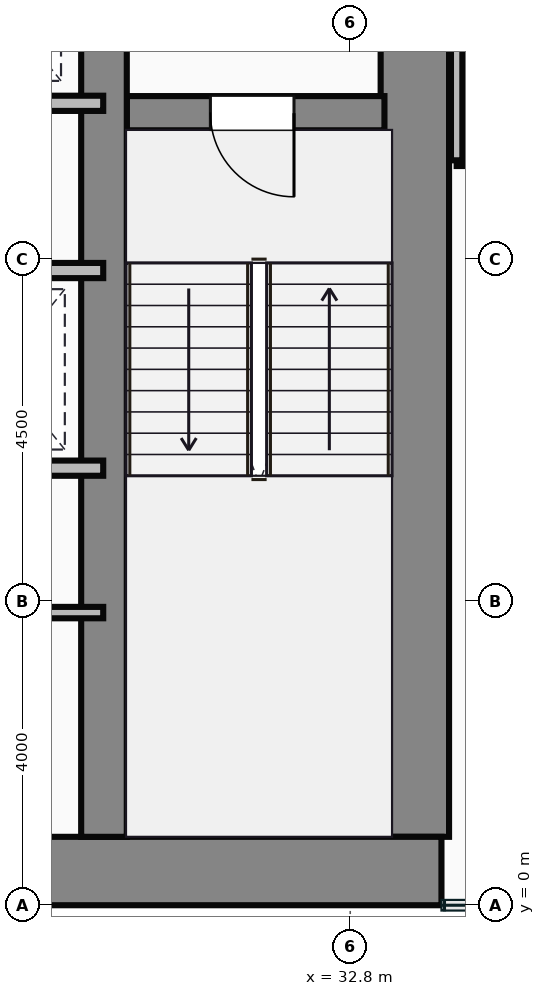
"""IFC4 building model, lengths in metres.
Left out: names, types, materials, properties, quantities, classifications, styles, units other than length and angle.
Written with IfcOpenShell. Run it as: python <this file> out.ifc"""

import sys

from ifc_helpers import new_model, si_unit, direction, frame, frame_2d, origin, place, context, subcontext, project, spatial, rectangle, extrude, source, transform, mapped, element, fill, save


model = new_model("IFC4")
c1 = context("Model", 3, precision=1e-05, world=origin(), true_north=direction((0.0, 1.0)))
c2 = subcontext(c1, "Body", "Model", "MODEL_VIEW")
j1 = project(units=[si_unit("LENGTHUNIT", "METRE"), si_unit("PLANEANGLEUNIT", "RADIAN")], contexts=[c1])
p1 = place(None, origin())
s1 = spatial("IfcSite", under=j1, at=p1, CompositionType="ELEMENT")
p2 = place(p1, origin())
s2 = spatial("IfcBuilding", under=s1, at=p2, CompositionType="ELEMENT")
p3 = place(p2, frame((0.0, 0.0, 61.7)))
s3 = spatial("IfcBuildingStorey", under=s2, at=p3, CompositionType="ELEMENT", Elevation=61.7)
m1 = source(origin(), c2, "Body", "SweptSolid", [
    extrude(rectangle(XDim=29.5, YDim=0.9, at=frame_2d((14.75, 0.0))), origin(), (0.0, 0.0, 1.0), 3.65),
])
p4 = place(p3, frame((4.5, 0.45, 0.0), z_axis=(0.0, 0.0, 1.0), x_axis=(1.0, 0.0, 0.0)))
e1 = element("IfcWall", 1, at=p4, inside=s3, PredefinedType="SHEAR", context=c2, shape_type="MappedRepresentation", body=[
    mapped(m1, transform((0.0, 0.0, 0.0))),
])
m2 = source(origin(), c2, "Body", "SweptSolid", [
    extrude(rectangle(XDim=13.1, YDim=0.9, at=frame_2d((6.55, 0.0))), origin(), (0.0, 0.0, 1.0), 3.65),
])
p5 = place(p3, frame((33.65, 0.9, 0.0), z_axis=(0.0, 0.0, 1.0), x_axis=(0.0, 1.0, 0.0)))
e2 = element("IfcWall", 2, at=p5, inside=s3, PredefinedType="SHEAR", context=c2, shape_type="MappedRepresentation", body=[
    mapped(m2, transform((0.0, 0.0, 0.0))),
])
m3 = source(origin(), c2, "Body", "SweptSolid", [
    extrude(rectangle(XDim=12.2, YDim=0.6, at=frame_2d((6.1, 0.0))), origin(), (0.0, 0.0, 1.0), 3.65),
])
p6 = place(p3, frame((29.56, 0.9, 0.0), z_axis=(0.0, 0.0, 1.0), x_axis=(0.0, 1.0, 0.0)))
e3 = element("IfcWall", 3, at=p6, inside=s3, PredefinedType="SHEAR", context=c2, shape_type="MappedRepresentation", body=[
    mapped(m3, transform((0.0, 0.0, 0.0))),
])
m4 = source(origin(), c2, "Body", "SweptSolid", [
    extrude(rectangle(XDim=3.39, YDim=0.45, at=frame_2d((1.695, 0.0))), origin(), (0.0, 0.0, 1.0), 3.65),
])
p7 = place(p3, frame((29.86, 10.42, 0.0), z_axis=(0.0, 0.0, 1.0), x_axis=(1.0, 0.0, 0.0)))
e4 = element("IfcWall", 4, at=p7, inside=s3, PredefinedType="SHEAR", context=c2, shape_type="MappedRepresentation", body=[
    mapped(m4, transform((0.0, 0.0, 0.0))),
])
p8 = place(p7, frame((1.1, 0.0, 0.0)))
e5 = element("IfcOpeningElement", 5, at=p8, cuts=e4, PredefinedType="OPENING", context=c2, shape_type="SweptSolid", body=[
    extrude(rectangle(XDim=1.1, YDim=2.15, at=frame_2d((0.55, 1.075))), frame((0.0, 0.235, 0.0), z_axis=(0.0, -1.0, 0.0), x_axis=(1.0, 0.0, 0.0)), (0.0, 0.0, 1.0), 0.47),
])
m5 = source(origin(), c2, "Body", "SweptSolid", [
    extrude(rectangle(XDim=8.8, YDim=0.2, at=frame_2d((4.4, 0.0))), origin(), (0.0, 0.0, 1.0), 3.4),
])
p9 = place(p3, frame((20.75, 10.55, 0.0), z_axis=(0.0, 0.0, 1.0), x_axis=(1.0, 0.0, 0.0)))
e6 = element("IfcWall", 6, at=p9, inside=s3, PredefinedType="PARTITIONING", context=c2, shape_type="MappedRepresentation", body=[
    mapped(m5, transform((0.0, 0.0, 0.0))),
])
m6 = source(origin(), c2, "Body", "SweptSolid", [
    extrude(rectangle(XDim=4.55, YDim=0.2, at=frame_2d((2.275, 0.0))), origin(), (0.0, 0.0, 1.0), 3.4),
])
for number, where, z_axis, x_axis in (
    (7, (25.0, 8.35, 0.0), (0.0, 0.0, 1.0), (1.0, 0.0, 0.0)),
    (8, (25.0, 5.75, 0.0), (0.0, 0.0, 1.0), (1.0, 0.0, 0.0)),
):
    element("IfcWall", number, at=place(p3, frame(where, z_axis=z_axis, x_axis=x_axis)), inside=s3, PredefinedType="PARTITIONING", context=c2, shape_type="MappedRepresentation", body=[
        mapped(m6, transform((0.0, 0.0, 0.0))),
    ])
m7 = source(origin(), c2, "Body", "SweptSolid", [
    extrude(rectangle(XDim=4.55, YDim=0.15, at=frame_2d((2.275, 0.0))), origin(), (0.0, 0.0, 1.0), 3.4),
])
p10 = place(p3, frame((25.0, 3.85, 0.0), z_axis=(0.0, 0.0, 1.0), x_axis=(1.0, 0.0, 0.0)))
e9 = element("IfcWall", 9, at=p10, inside=s3, PredefinedType="PARTITIONING", context=c2, shape_type="MappedRepresentation", body=[
    mapped(m7, transform((0.0, 0.0, 0.0))),
])
m8 = source(origin(), c2, "Body", "SweptSolid", [
    extrude(rectangle(XDim=4.8, YDim=0.15, at=frame_2d((2.4, 0.0))), origin(), (0.0, 0.0, 1.0), 3.4),
])
p11 = place(p3, frame((34.2, 9.8, 0.0), z_axis=(0.0, 0.0, 1.0), x_axis=(1.0, 0.0, 0.0)))
e10 = element("IfcWall", 10, at=p11, inside=s3, PredefinedType="PARTITIONING", context=c2, shape_type="MappedRepresentation", body=[
    mapped(m8, transform((0.0, 0.0, 0.0))),
])
m9 = source(origin(), c2, "Body", "SweptSolid", [
    extrude(rectangle(XDim=4.18, YDim=0.15, at=frame_2d((2.09, 0.0))), origin(), (0.0, 0.0, 1.0), 3.4),
])
p12 = place(p3, frame((34.2, 9.8, 0.0), z_axis=(0.0, 0.0, 1.0), x_axis=(0.0, 1.0, 0.0)))
e11 = element("IfcWall", 11, at=p12, inside=s3, PredefinedType="PARTITIONING", context=c2, shape_type="MappedRepresentation", body=[
    mapped(m9, transform((0.0, 0.0, 0.0))),
])
m10 = source(origin(), c2, "Body", "SweptSolid", [
    extrude(rectangle(XDim=1.1, YDim=2.15, at=frame_2d((0.55, 1.075))), frame((0.0, 0.025, 0.0), z_axis=(0.0, -1.0, 0.0), x_axis=(1.0, 0.0, 0.0)), (0.0, 0.0, 1.0), 0.05),
])
p13 = place(p8, frame((1.1, 0.0, 0.0), z_axis=(0.0, 0.0, 1.0), x_axis=(-1.0, 0.0, 0.0)))
e12 = element("IfcDoor", 12, at=p13, inside=s3, OperationType="SINGLE_SWING_RIGHT", PredefinedType="DOOR", context=c2, shape_type="MappedRepresentation", body=[
    mapped(m10, transform((0.0, 0.0, 0.0))),
])
fill(e5, e12)
save(model, sys.argv[1])
